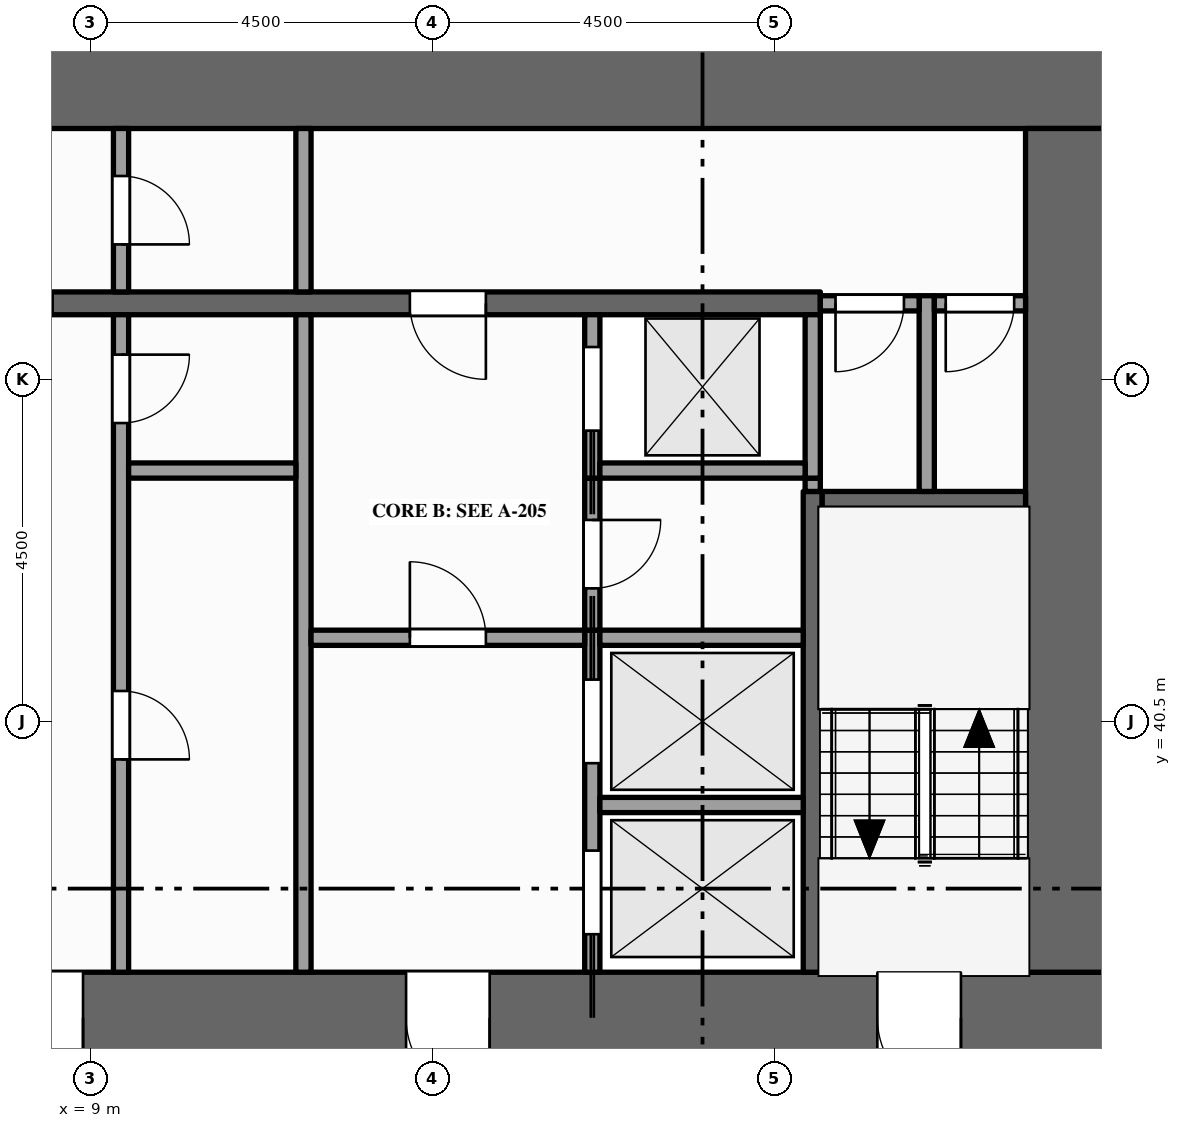
"""IFC4 building model, lengths in metres.
Left out: names, types, materials, properties, quantities, classifications, styles, units other than length and angle.
Written with IfcOpenShell. Run it as: python <this file> out.ifc"""

import sys

from ifc_helpers import new_model, si_unit, direction, frame, frame_2d, origin, place, context, subcontext, project, spatial, rectangle, extrude, element, fill, save


model = new_model("IFC4")
c1 = context("Model", 3, precision=1e-05, world=origin(), true_north=direction((0.0, 1.0)))
c2 = subcontext(c1, "Body", "Model", "MODEL_VIEW")
j1 = project(units=[si_unit("LENGTHUNIT", "METRE"), si_unit("PLANEANGLEUNIT", "RADIAN")], contexts=[c1])
p1 = place(None, origin())
s1 = spatial("IfcSite", under=j1, at=p1, CompositionType="ELEMENT")
p2 = place(p1, origin())
s2 = spatial("IfcBuilding", under=s1, at=p2, CompositionType="ELEMENT")
p3 = place(p2, frame((0.0, 0.0, 24.0)))
s3 = spatial("IfcBuildingStorey", under=s2, at=p3, CompositionType="ELEMENT", Elevation=24.0)
p4 = place(p3, frame((0.0, 36.6, -0.15), z_axis=(0.0, 0.0, 1.0), x_axis=(1.0, 0.0, 0.0)))
e1 = element("IfcWall", 1, at=p4, inside=s3, PredefinedType="SHEAR", context=c2, shape_type="SweptSolid", body=[
    extrude(rectangle(XDim=22.5, YDim=1.2, at=frame_2d((11.25, 0.0))), origin(), (0.0, 0.0, 1.0), 5.0),
])
p5 = place(p4, frame((7.1, 0.0, 0.15)))
e2 = element("IfcOpeningElement", 2, at=p5, cuts=e1, PredefinedType="OPENING", context=c2, shape_type="SweptSolid", body=[
    extrude(rectangle(XDim=1.8, YDim=2.1, at=frame_2d((0.9, 1.05))), frame((0.0, 0.61, 0.0), z_axis=(0.0, -1.0, 0.0), x_axis=(1.0, 0.0, 0.0)), (0.0, 0.0, 1.0), 1.22),
])
p6 = place(p4, frame((13.15, 0.0, 0.15)))
e3 = element("IfcOpeningElement", 3, at=p6, cuts=e1, PredefinedType="OPENING", context=c2, shape_type="SweptSolid", body=[
    extrude(rectangle(XDim=1.1, YDim=2.1, at=frame_2d((0.55, 1.05))), frame((0.0, 0.61, 0.0), z_axis=(0.0, -1.0, 0.0), x_axis=(1.0, 0.0, 0.0)), (0.0, 0.0, 1.0), 1.22),
])
p7 = place(p4, frame((2.15, 0.0, 0.15)))
e4 = element("IfcOpeningElement", 4, at=p7, cuts=e1, PredefinedType="OPENING", context=c2, shape_type="SweptSolid", body=[
    extrude(rectangle(XDim=1.1, YDim=2.1, at=frame_2d((0.55, 1.05))), frame((0.0, 0.61, 0.0), z_axis=(0.0, -1.0, 0.0), x_axis=(1.0, 0.0, 0.0)), (0.0, 0.0, 1.0), 1.22),
])
p8 = place(p4, frame((19.35, 0.0, 0.15)))
e5 = element("IfcOpeningElement", 5, at=p8, cuts=e1, PredefinedType="OPENING", context=c2, shape_type="SweptSolid", body=[
    extrude(rectangle(XDim=1.1, YDim=2.1, at=frame_2d((0.55, 1.05))), frame((0.0, 0.61, 0.0), z_axis=(0.0, -1.0, 0.0), x_axis=(1.0, 0.0, 0.0)), (0.0, 0.0, 1.0), 1.22),
])
p9 = place(p3, frame((0.0, 48.9, -0.15), z_axis=(0.0, 0.0, 1.0), x_axis=(1.0, 0.0, 0.0)))
e6 = element("IfcWall", 6, at=p9, inside=s3, PredefinedType="SHEAR", context=c2, shape_type="SweptSolid", body=[
    extrude(rectangle(XDim=22.5, YDim=1.2, at=frame_2d((11.25, 0.0))), origin(), (0.0, 0.0, 1.0), 5.0),
])
p10 = place(p3, frame((21.9, 37.2, -0.15), z_axis=(0.0, 0.0, 1.0), x_axis=(0.0, 1.0, 0.0)))
e7 = element("IfcWall", 7, at=p10, inside=s3, PredefinedType="SHEAR", context=c2, shape_type="SweptSolid", body=[
    extrude(rectangle(XDim=11.1, YDim=1.2, at=frame_2d((5.55, 0.0))), origin(), (0.0, 0.0, 1.0), 5.0),
])
p11 = place(p3, frame((9.4, 37.2, 0.0), z_axis=(0.0, 0.0, 1.0), x_axis=(0.0, 1.0, 0.0)))
e8 = element("IfcWall", 8, at=p11, inside=s3, PredefinedType="PARTITIONING", context=c2, shape_type="SweptSolid", body=[
    extrude(rectangle(XDim=8.65, YDim=0.2, at=frame_2d((4.325, 0.0))), origin(), (0.0, 0.0, 1.0), 4.85),
])
p12 = place(p11, frame((2.8, 0.0, 0.0)))
e9 = element("IfcOpeningElement", 9, at=p12, cuts=e8, PredefinedType="OPENING", context=c2, shape_type="SweptSolid", body=[
    extrude(rectangle(XDim=0.9, YDim=2.1, at=frame_2d((0.45, 1.05))), frame((0.0, 0.11, 0.0), z_axis=(0.0, -1.0, 0.0), x_axis=(1.0, 0.0, 0.0)), (0.0, 0.0, 1.0), 0.22),
])
p13 = place(p11, frame((7.225, 0.0, 0.0)))
e10 = element("IfcOpeningElement", 10, at=p13, cuts=e8, PredefinedType="OPENING", context=c2, shape_type="SweptSolid", body=[
    extrude(rectangle(XDim=0.9, YDim=2.1, at=frame_2d((0.45, 1.05))), frame((0.0, 0.11, 0.0), z_axis=(0.0, -1.0, 0.0), x_axis=(1.0, 0.0, 0.0)), (0.0, 0.0, 1.0), 0.22),
])
p14 = place(p3, frame((9.4, 46.15, 0.0), z_axis=(0.0, 0.0, 1.0), x_axis=(0.0, 1.0, 0.0)))
e11 = element("IfcWall", 11, at=p14, inside=s3, PredefinedType="PARTITIONING", context=c2, shape_type="SweptSolid", body=[
    extrude(rectangle(XDim=2.15, YDim=0.2, at=frame_2d((1.075, 0.0))), origin(), (0.0, 0.0, 1.0), 4.85),
])
p15 = place(p14, frame((0.625, 0.0, 0.0)))
e12 = element("IfcOpeningElement", 12, at=p15, cuts=e11, PredefinedType="OPENING", context=c2, shape_type="SweptSolid", body=[
    extrude(rectangle(XDim=0.9, YDim=2.1, at=frame_2d((0.45, 1.05))), frame((0.0, 0.11, 0.0), z_axis=(0.0, -1.0, 0.0), x_axis=(1.0, 0.0, 0.0)), (0.0, 0.0, 1.0), 0.22),
])
p16 = place(p3, frame((11.8, 37.2, 0.0), z_axis=(0.0, 0.0, 1.0), x_axis=(0.0, 1.0, 0.0)))
e13 = element("IfcWall", 13, at=p16, inside=s3, PredefinedType="PARTITIONING", context=c2, shape_type="SweptSolid", body=[
    extrude(rectangle(XDim=8.65, YDim=0.2, at=frame_2d((4.325, 0.0))), origin(), (0.0, 0.0, 1.0), 4.85),
])
p17 = place(p3, frame((11.8, 46.15, 0.0), z_axis=(0.0, 0.0, 1.0), x_axis=(0.0, 1.0, 0.0)))
e14 = element("IfcWall", 14, at=p17, inside=s3, PredefinedType="PARTITIONING", context=c2, shape_type="SweptSolid", body=[
    extrude(rectangle(XDim=2.15, YDim=0.2, at=frame_2d((1.075, 0.0))), origin(), (0.0, 0.0, 1.0), 4.85),
])
p18 = place(p3, frame((15.6, 37.2, 0.0), z_axis=(0.0, 0.0, 1.0), x_axis=(0.0, 1.0, 0.0)))
e15 = element("IfcWall", 15, at=p18, inside=s3, PredefinedType="SOLIDWALL", context=c2, shape_type="SweptSolid", body=[
    extrude(rectangle(XDim=4.5, YDim=0.2, at=frame_2d((2.25, 0.0))), origin(), (0.0, 0.0, 1.0), 4.85),
])
p19 = place(p18, frame((0.5, 0.0, 0.012)))
e16 = element("IfcOpeningElement", 16, at=p19, cuts=e15, PredefinedType="OPENING", context=c2, shape_type="SweptSolid", body=[
    extrude(rectangle(XDim=1.1, YDim=2.1, at=frame_2d((0.55, 1.05))), frame((0.0, 0.11, 0.0), z_axis=(0.0, -1.0, 0.0), x_axis=(1.0, 0.0, 0.0)), (0.0, 0.0, 1.0), 0.22),
])
p20 = place(p18, frame((2.75, 0.0, 0.012)))
e17 = element("IfcOpeningElement", 17, at=p20, cuts=e15, PredefinedType="OPENING", context=c2, shape_type="SweptSolid", body=[
    extrude(rectangle(XDim=1.1, YDim=2.1, at=frame_2d((0.55, 1.05))), frame((0.0, 0.11, 0.0), z_axis=(0.0, -1.0, 0.0), x_axis=(1.0, 0.0, 0.0)), (0.0, 0.0, 1.0), 0.22),
])
p21 = place(p3, frame((15.6, 41.7, 0.0), z_axis=(0.0, 0.0, 1.0), x_axis=(0.0, 1.0, 0.0)))
e18 = element("IfcWall", 18, at=p21, inside=s3, PredefinedType="PARTITIONING", context=c2, shape_type="SweptSolid", body=[
    extrude(rectangle(XDim=2.0, YDim=0.2, at=frame_2d((1.0, 0.0))), origin(), (0.0, 0.0, 1.0), 4.85),
])
p22 = place(p21, frame((0.55, 0.0, 0.0)))
e19 = element("IfcOpeningElement", 19, at=p22, cuts=e18, PredefinedType="OPENING", context=c2, shape_type="SweptSolid", body=[
    extrude(rectangle(XDim=0.9, YDim=2.1, at=frame_2d((0.45, 1.05))), frame((0.0, 0.11, 0.0), z_axis=(0.0, -1.0, 0.0), x_axis=(1.0, 0.0, 0.0)), (0.0, 0.0, 1.0), 0.22),
])
p23 = place(p3, frame((15.6, 43.7, 0.0), z_axis=(0.0, 0.0, 1.0), x_axis=(0.0, 1.0, 0.0)))
e20 = element("IfcWall", 20, at=p23, inside=s3, PredefinedType="SOLIDWALL", context=c2, shape_type="SweptSolid", body=[
    extrude(rectangle(XDim=2.15, YDim=0.2, at=frame_2d((1.075, 0.0))), origin(), (0.0, 0.0, 1.0), 4.85),
])
p24 = place(p23, frame((0.625, 0.0, 0.012)))
e21 = element("IfcOpeningElement", 21, at=p24, cuts=e20, PredefinedType="OPENING", context=c2, shape_type="SweptSolid", body=[
    extrude(rectangle(XDim=1.1, YDim=2.1, at=frame_2d((0.55, 1.05))), frame((0.0, 0.11, 0.0), z_axis=(0.0, -1.0, 0.0), x_axis=(1.0, 0.0, 0.0)), (0.0, 0.0, 1.0), 0.22),
])
p25 = place(p3, frame((18.5, 37.2, 0.0), z_axis=(0.0, 0.0, 1.0), x_axis=(0.0, 1.0, 0.0)))
e22 = element("IfcWall", 22, at=p25, inside=s3, PredefinedType="SHEAR", context=c2, shape_type="SweptSolid", body=[
    extrude(rectangle(XDim=6.325, YDim=0.25, at=frame_2d((3.163, 0.0))), origin(), (0.0, 0.0, 1.0), 4.85),
])
p26 = place(p3, frame((18.5, 43.525, 0.0), z_axis=(0.0, 0.0, 1.0), x_axis=(0.0, 1.0, 0.0)))
e23 = element("IfcWall", 23, at=p26, inside=s3, PredefinedType="PARTITIONING", context=c2, shape_type="SweptSolid", body=[
    extrude(rectangle(XDim=0.175, YDim=0.2, at=frame_2d((0.087, 0.0))), origin(), (0.0, 0.0, 1.0), 4.85),
])
p27 = place(p3, frame((18.5, 43.7, 0.0), z_axis=(0.0, 0.0, 1.0), x_axis=(0.0, 1.0, 0.0)))
e24 = element("IfcWall", 24, at=p27, inside=s3, PredefinedType="SOLIDWALL", context=c2, shape_type="SweptSolid", body=[
    extrude(rectangle(XDim=2.15, YDim=0.2, at=frame_2d((1.075, 0.0))), origin(), (0.0, 0.0, 1.0), 4.85),
])
p28 = place(p3, frame((20.0, 43.525, 0.0), z_axis=(0.0, 0.0, 1.0), x_axis=(0.0, 1.0, 0.0)))
e25 = element("IfcWall", 25, at=p28, inside=s3, PredefinedType="PARTITIONING", context=c2, shape_type="SweptSolid", body=[
    extrude(rectangle(XDim=2.575, YDim=0.2, at=frame_2d((1.288, 0.0))), origin(), (0.0, 0.0, 1.0), 4.85),
])
p29 = place(p3, frame((15.7, 39.4, 0.0), z_axis=(0.0, 0.0, 1.0), x_axis=(1.0, 0.0, 0.0)))
e26 = element("IfcWall", 26, at=p29, inside=s3, PredefinedType="SOLIDWALL", context=c2, shape_type="SweptSolid", body=[
    extrude(rectangle(XDim=2.675, YDim=0.2, at=frame_2d((1.337, 0.0))), origin(), (0.0, 0.0, 1.0), 4.85),
])
p30 = place(p3, frame((11.9, 41.6, 0.0), z_axis=(0.0, 0.0, 1.0), x_axis=(1.0, 0.0, 0.0)))
e27 = element("IfcWall", 27, at=p30, inside=s3, PredefinedType="PARTITIONING", context=c2, shape_type="SweptSolid", body=[
    extrude(rectangle(XDim=3.6, YDim=0.2, at=frame_2d((1.8, 0.0))), origin(), (0.0, 0.0, 1.0), 4.85),
])
p31 = place(p30, frame((1.3, 0.0, 0.0)))
e28 = element("IfcOpeningElement", 28, at=p31, cuts=e27, PredefinedType="OPENING", context=c2, shape_type="SweptSolid", body=[
    extrude(rectangle(XDim=1.0, YDim=2.1, at=frame_2d((0.5, 1.05))), frame((0.0, 0.11, 0.0), z_axis=(0.0, -1.0, 0.0), x_axis=(1.0, 0.0, 0.0)), (0.0, 0.0, 1.0), 0.22),
])
p32 = place(p3, frame((15.7, 41.6, 0.0), z_axis=(0.0, 0.0, 1.0), x_axis=(1.0, 0.0, 0.0)))
e29 = element("IfcWall", 29, at=p32, inside=s3, PredefinedType="SOLIDWALL", context=c2, shape_type="SweptSolid", body=[
    extrude(rectangle(XDim=2.675, YDim=0.2, at=frame_2d((1.337, 0.0))), origin(), (0.0, 0.0, 1.0), 4.85),
])
p33 = place(p3, frame((18.625, 43.4, 0.0), z_axis=(0.0, 0.0, 1.0), x_axis=(1.0, 0.0, 0.0)))
e30 = element("IfcWall", 30, at=p33, inside=s3, PredefinedType="SHEAR", context=c2, shape_type="SweptSolid", body=[
    extrude(rectangle(XDim=2.675, YDim=0.25, at=frame_2d((1.337, 0.0))), origin(), (0.0, 0.0, 1.0), 4.85),
])
p34 = place(p3, frame((9.5, 43.8, 0.0), z_axis=(0.0, 0.0, 1.0), x_axis=(1.0, 0.0, 0.0)))
e31 = element("IfcWall", 31, at=p34, inside=s3, PredefinedType="PARTITIONING", context=c2, shape_type="SweptSolid", body=[
    extrude(rectangle(XDim=2.2, YDim=0.2, at=frame_2d((1.1, 0.0))), origin(), (0.0, 0.0, 1.0), 4.85),
])
p35 = place(p3, frame((15.7, 43.8, 0.0), z_axis=(0.0, 0.0, 1.0), x_axis=(1.0, 0.0, 0.0)))
e32 = element("IfcWall", 32, at=p35, inside=s3, PredefinedType="SOLIDWALL", context=c2, shape_type="SweptSolid", body=[
    extrude(rectangle(XDim=2.7, YDim=0.2, at=frame_2d((1.35, 0.0))), origin(), (0.0, 0.0, 1.0), 4.85),
])
p36 = place(p3, frame((4.1, 46.0, 0.0), z_axis=(0.0, 0.0, 1.0), x_axis=(1.0, 0.0, 0.0)))
e33 = element("IfcWall", 33, at=p36, inside=s3, PredefinedType="SHEAR", context=c2, shape_type="SweptSolid", body=[
    extrude(rectangle(XDim=14.5, YDim=0.3, at=frame_2d((7.25, 0.0))), origin(), (0.0, 0.0, 1.0), 4.85),
])
p37 = place(p36, frame((3.4, 0.0, 0.0)))
e34 = element("IfcOpeningElement", 34, at=p37, cuts=e33, PredefinedType="OPENING", context=c2, shape_type="SweptSolid", body=[
    extrude(rectangle(XDim=1.0, YDim=2.1, at=frame_2d((0.5, 1.05))), frame((0.0, 0.16, 0.0), z_axis=(0.0, -1.0, 0.0), x_axis=(1.0, 0.0, 0.0)), (0.0, 0.0, 1.0), 0.32),
])
p38 = place(p36, frame((9.1, 0.0, 0.0)))
e35 = element("IfcOpeningElement", 35, at=p38, cuts=e33, PredefinedType="OPENING", context=c2, shape_type="SweptSolid", body=[
    extrude(rectangle(XDim=1.0, YDim=2.1, at=frame_2d((0.5, 1.05))), frame((0.0, 0.16, 0.0), z_axis=(0.0, -1.0, 0.0), x_axis=(1.0, 0.0, 0.0)), (0.0, 0.0, 1.0), 0.32),
])
p39 = place(p3, frame((18.6, 46.0, 0.0), z_axis=(0.0, 0.0, 1.0), x_axis=(1.0, 0.0, 0.0)))
e36 = element("IfcWall", 36, at=p39, inside=s3, PredefinedType="PARTITIONING", context=c2, shape_type="SweptSolid", body=[
    extrude(rectangle(XDim=1.3, YDim=0.2, at=frame_2d((0.65, 0.0))), origin(), (0.0, 0.0, 1.0), 4.85),
])
p40 = place(p39, frame((0.2, 0.0, 0.0)))
e37 = element("IfcOpeningElement", 37, at=p40, cuts=e36, PredefinedType="OPENING", context=c2, shape_type="SweptSolid", body=[
    extrude(rectangle(XDim=0.9, YDim=2.1, at=frame_2d((0.45, 1.05))), frame((0.0, 0.11, 0.0), z_axis=(0.0, -1.0, 0.0), x_axis=(1.0, 0.0, 0.0)), (0.0, 0.0, 1.0), 0.22),
])
p41 = place(p3, frame((20.1, 46.0, 0.0), z_axis=(0.0, 0.0, 1.0), x_axis=(1.0, 0.0, 0.0)))
e38 = element("IfcWall", 38, at=p41, inside=s3, PredefinedType="PARTITIONING", context=c2, shape_type="SweptSolid", body=[
    extrude(rectangle(XDim=1.2, YDim=0.2, at=frame_2d((0.6, 0.0))), origin(), (0.0, 0.0, 1.0), 4.85),
])
p42 = place(p41, frame((0.15, 0.0, 0.0)))
e39 = element("IfcOpeningElement", 39, at=p42, cuts=e38, PredefinedType="OPENING", context=c2, shape_type="SweptSolid", body=[
    extrude(rectangle(XDim=0.9, YDim=2.1, at=frame_2d((0.45, 1.05))), frame((0.0, 0.11, 0.0), z_axis=(0.0, -1.0, 0.0), x_axis=(1.0, 0.0, 0.0)), (0.0, 0.0, 1.0), 0.22),
])
p43 = place(p19, origin())
e40 = element("IfcDoor", 40, at=p43, inside=s3, OperationType="SLIDING_TO_LEFT", PredefinedType="DOOR", context=c2, shape_type="SweptSolid", body=[
    extrude(rectangle(XDim=1.1, YDim=2.1, at=frame_2d((0.55, 1.05))), frame((0.0, 0.025, 0.0), z_axis=(0.0, -1.0, 0.0), x_axis=(1.0, 0.0, 0.0)), (0.0, 0.0, 1.0), 0.05),
])
fill(e16, e40)
p44 = place(p20, origin())
e41 = element("IfcDoor", 41, at=p44, inside=s3, OperationType="SLIDING_TO_RIGHT", PredefinedType="DOOR", context=c2, shape_type="SweptSolid", body=[
    extrude(rectangle(XDim=1.1, YDim=2.1, at=frame_2d((0.55, 1.05))), frame((0.0, 0.025, 0.0), z_axis=(0.0, -1.0, 0.0), x_axis=(1.0, 0.0, 0.0)), (0.0, 0.0, 1.0), 0.05),
])
fill(e17, e41)
p45 = place(p24, origin())
e42 = element("IfcDoor", 42, at=p45, inside=s3, OperationType="SLIDING_TO_LEFT", PredefinedType="DOOR", context=c2, shape_type="SweptSolid", body=[
    extrude(rectangle(XDim=1.1, YDim=2.1, at=frame_2d((0.55, 1.05))), frame((0.0, 0.025, 0.0), z_axis=(0.0, -1.0, 0.0), x_axis=(1.0, 0.0, 0.0)), (0.0, 0.0, 1.0), 0.05),
])
fill(e21, e42)
p46 = place(p5, origin())
e43 = element("IfcDoor", 43, at=p46, inside=s3, OperationType="DOUBLE_DOOR_SINGLE_SWING", PredefinedType="DOOR", context=c2, shape_type="SweptSolid", body=[
    extrude(rectangle(XDim=1.8, YDim=2.1, at=frame_2d((0.9, 1.05))), frame((0.0, 0.025, 0.0), z_axis=(0.0, -1.0, 0.0), x_axis=(1.0, 0.0, 0.0)), (0.0, 0.0, 1.0), 0.05),
])
fill(e2, e43)
p47 = place(p6, origin())
e44 = element("IfcDoor", 44, at=p47, inside=s3, OperationType="SINGLE_SWING_RIGHT", PredefinedType="DOOR", context=c2, shape_type="SweptSolid", body=[
    extrude(rectangle(XDim=1.1, YDim=2.1, at=frame_2d((0.55, 1.05))), frame((0.0, 0.025, 0.0), z_axis=(0.0, -1.0, 0.0), x_axis=(1.0, 0.0, 0.0)), (0.0, 0.0, 1.0), 0.05),
])
fill(e3, e44)
p48 = place(p31, origin())
e45 = element("IfcDoor", 45, at=p48, inside=s3, OperationType="SINGLE_SWING_LEFT", PredefinedType="DOOR", context=c2, shape_type="SweptSolid", body=[
    extrude(rectangle(XDim=1.0, YDim=2.1, at=frame_2d((0.5, 1.05))), frame((0.0, 0.025, 0.0), z_axis=(0.0, -1.0, 0.0), x_axis=(1.0, 0.0, 0.0)), (0.0, 0.0, 1.0), 0.05),
])
fill(e28, e45)
p49 = place(p38, origin())
e46 = element("IfcDoor", 46, at=p49, inside=s3, OperationType="SINGLE_SWING_RIGHT", PredefinedType="DOOR", context=c2, shape_type="SweptSolid", body=[
    extrude(rectangle(XDim=1.0, YDim=2.1, at=frame_2d((0.5, 1.05))), frame((0.0, 0.025, 0.0), z_axis=(0.0, -1.0, 0.0), x_axis=(1.0, 0.0, 0.0)), (0.0, 0.0, 1.0), 0.05),
])
fill(e35, e46)
p50 = place(p15, origin())
e47 = element("IfcDoor", 47, at=p50, inside=s3, OperationType="SINGLE_SWING_LEFT", PredefinedType="DOOR", context=c2, shape_type="SweptSolid", body=[
    extrude(rectangle(XDim=0.9, YDim=2.1, at=frame_2d((0.45, 1.05))), frame((0.0, 0.025, 0.0), z_axis=(0.0, -1.0, 0.0), x_axis=(1.0, 0.0, 0.0)), (0.0, 0.0, 1.0), 0.05),
])
fill(e12, e47)
p51 = place(p8, origin())
e48 = element("IfcDoor", 48, at=p51, inside=s3, OperationType="SINGLE_SWING_RIGHT", PredefinedType="DOOR", context=c2, shape_type="SweptSolid", body=[
    extrude(rectangle(XDim=1.1, YDim=2.1, at=frame_2d((0.55, 1.05))), frame((0.0, 0.025, 0.0), z_axis=(0.0, -1.0, 0.0), x_axis=(1.0, 0.0, 0.0)), (0.0, 0.0, 1.0), 0.05),
])
fill(e5, e48)
p52 = place(p40, origin())
e49 = element("IfcDoor", 49, at=p52, inside=s3, OperationType="SINGLE_SWING_LEFT", PredefinedType="DOOR", context=c2, shape_type="SweptSolid", body=[
    extrude(rectangle(XDim=0.9, YDim=2.1, at=frame_2d((0.45, 1.05))), frame((0.0, 0.025, 0.0), z_axis=(0.0, -1.0, 0.0), x_axis=(1.0, 0.0, 0.0)), (0.0, 0.0, 1.0), 0.05),
])
fill(e37, e49)
p53 = place(p42, origin())
e50 = element("IfcDoor", 50, at=p53, inside=s3, OperationType="SINGLE_SWING_LEFT", PredefinedType="DOOR", context=c2, shape_type="SweptSolid", body=[
    extrude(rectangle(XDim=0.9, YDim=2.1, at=frame_2d((0.45, 1.05))), frame((0.0, 0.025, 0.0), z_axis=(0.0, -1.0, 0.0), x_axis=(1.0, 0.0, 0.0)), (0.0, 0.0, 1.0), 0.05),
])
fill(e39, e50)
p54 = place(p12, origin())
e51 = element("IfcDoor", 51, at=p54, inside=s3, OperationType="SINGLE_SWING_LEFT", PredefinedType="DOOR", context=c2, shape_type="SweptSolid", body=[
    extrude(rectangle(XDim=0.9, YDim=2.1, at=frame_2d((0.45, 1.05))), frame((0.0, 0.025, 0.0), z_axis=(0.0, -1.0, 0.0), x_axis=(1.0, 0.0, 0.0)), (0.0, 0.0, 1.0), 0.05),
])
fill(e9, e51)
p55 = place(p13, origin())
e52 = element("IfcDoor", 52, at=p55, inside=s3, OperationType="SINGLE_SWING_RIGHT", PredefinedType="DOOR", context=c2, shape_type="SweptSolid", body=[
    extrude(rectangle(XDim=0.9, YDim=2.1, at=frame_2d((0.45, 1.05))), frame((0.0, 0.025, 0.0), z_axis=(0.0, -1.0, 0.0), x_axis=(1.0, 0.0, 0.0)), (0.0, 0.0, 1.0), 0.05),
])
fill(e10, e52)
p56 = place(p22, origin())
e53 = element("IfcDoor", 53, at=p56, inside=s3, OperationType="SINGLE_SWING_RIGHT", PredefinedType="DOOR", context=c2, shape_type="SweptSolid", body=[
    extrude(rectangle(XDim=0.9, YDim=2.1, at=frame_2d((0.45, 1.05))), frame((0.0, 0.025, 0.0), z_axis=(0.0, -1.0, 0.0), x_axis=(1.0, 0.0, 0.0)), (0.0, 0.0, 1.0), 0.05),
])
fill(e19, e53)
save(model, sys.argv[1])
